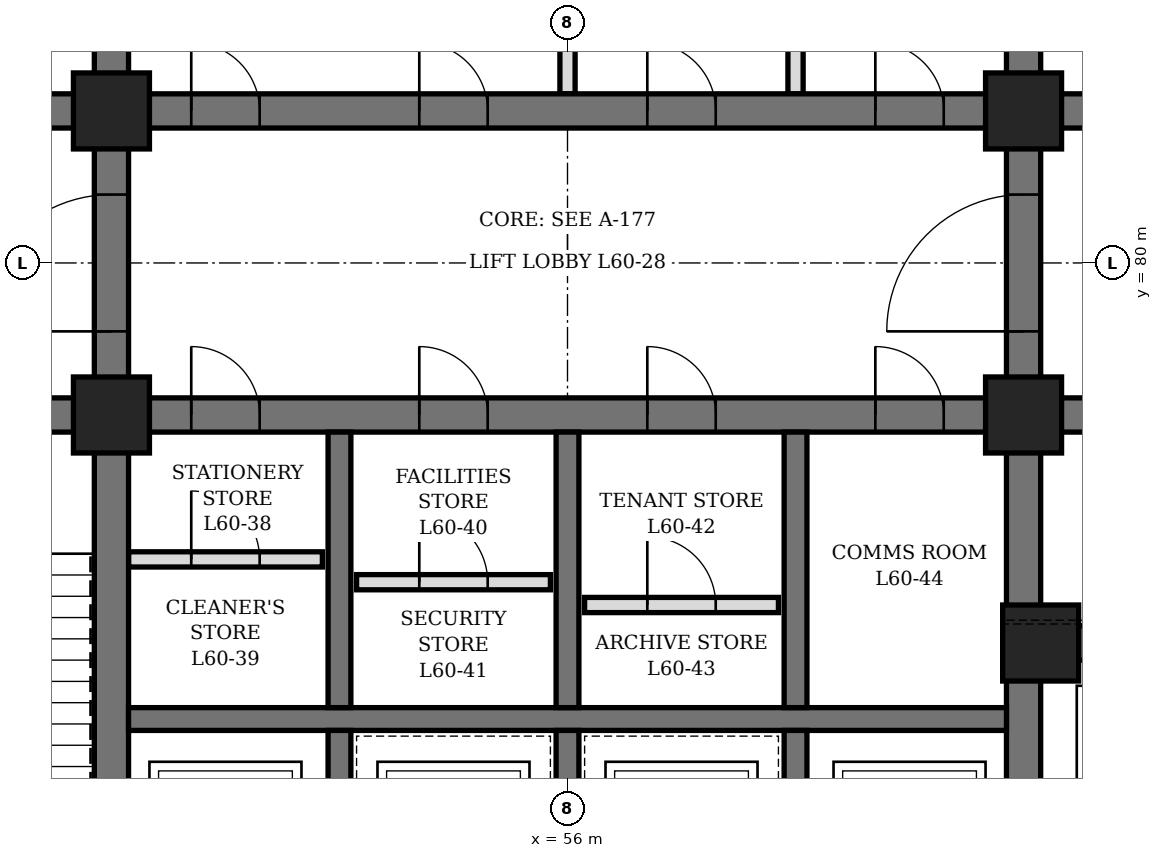
"""IFC4 building model, lengths in metres.
Left out: names, types, materials, properties, quantities, classifications, styles, units other than length and angle.
Written with IfcOpenShell. Run it as: python <this file> out.ifc"""

import sys

from ifc_helpers import new_model, si_unit, direction, frame, frame_2d, origin, origin_2d, place, context, subcontext, project, spatial, rectangle, hollow_rectangle, extrude, element, fill, save


model = new_model("IFC4")
c1 = context("Model", 3, precision=1e-05, world=origin(), true_north=direction((0.0, 1.0)))
c2 = subcontext(c1, "Body", "Model", "MODEL_VIEW")
j1 = project(units=[si_unit("LENGTHUNIT", "METRE"), si_unit("PLANEANGLEUNIT", "RADIAN")], contexts=[c1])
p1 = place(None, origin())
s1 = spatial("IfcSite", under=j1, at=p1, CompositionType="ELEMENT")
p2 = place(p1, origin())
s2 = spatial("IfcBuilding", under=s1, at=p2, CompositionType="ELEMENT")
p3 = place(p2, frame((0.0, 0.0, 267.1)))
s3 = spatial("IfcBuildingStorey", under=s2, at=p3, CompositionType="ELEMENT", Elevation=267.1)
p4 = place(p3, frame((50.0, 71.6, 0.0), z_axis=(0.0, 0.0, 1.0), x_axis=(0.0, 1.0, 0.0)))
e1 = element("IfcWall", 1, at=p4, inside=s3, PredefinedType="SHEAR", context=c2, shape_type="SweptSolid", body=[
    extrude(rectangle(XDim=16.8, YDim=0.45, at=frame_2d((8.4, 0.0))), origin(), (0.0, 0.0, 1.0), 4.2),
])
p5 = place(p4, frame((7.5, 0.0, 0.0)))
e2 = element("IfcOpeningElement", 2, at=p5, cuts=e1, PredefinedType="OPENING", context=c2, shape_type="SweptSolid", body=[
    extrude(rectangle(XDim=1.8, YDim=2.4, at=frame_2d((0.9, 1.2))), frame((0.0, 0.235, 0.0), z_axis=(0.0, -1.0, 0.0), x_axis=(1.0, 0.0, 0.0)), (0.0, 0.0, 1.0), 0.47),
])
p6 = place(p3, frame((62.0, 71.6, 0.0), z_axis=(0.0, 0.0, 1.0), x_axis=(0.0, 1.0, 0.0)))
e3 = element("IfcWall", 3, at=p6, inside=s3, PredefinedType="SHEAR", context=c2, shape_type="SweptSolid", body=[
    extrude(rectangle(XDim=16.8, YDim=0.45, at=frame_2d((8.4, 0.0))), origin(), (0.0, 0.0, 1.0), 4.2),
])
p7 = place(p6, frame((7.5, 0.0, 0.0)))
e4 = element("IfcOpeningElement", 4, at=p7, cuts=e3, PredefinedType="OPENING", context=c2, shape_type="SweptSolid", body=[
    extrude(rectangle(XDim=1.8, YDim=2.4, at=frame_2d((0.9, 1.2))), frame((0.0, 0.235, 0.0), z_axis=(0.0, -1.0, 0.0), x_axis=(1.0, 0.0, 0.0)), (0.0, 0.0, 1.0), 0.47),
])
p8 = place(p3, frame((44.6, 78.0, 0.0), z_axis=(0.0, 0.0, 1.0), x_axis=(1.0, 0.0, 0.0)))
e5 = element("IfcWall", 5, at=p8, inside=s3, PredefinedType="SHEAR", context=c2, shape_type="SweptSolid", body=[
    extrude(rectangle(XDim=5.175, YDim=0.45, at=frame_2d((2.587, 0.0))), origin(), (0.0, 0.0, 1.0), 4.2),
])
p9 = place(p8, frame((1.8, 0.0, 0.0)))
e6 = element("IfcOpeningElement", 6, at=p9, cuts=e5, PredefinedType="OPENING", context=c2, shape_type="SweptSolid", body=[
    extrude(rectangle(XDim=1.2, YDim=2.1, at=frame_2d((0.6, 1.05))), frame((0.0, 0.235, 0.0), z_axis=(0.0, -1.0, 0.0), x_axis=(1.0, 0.0, 0.0)), (0.0, 0.0, 1.0), 0.47),
])
p10 = place(p3, frame((44.6, 82.0, 0.0), z_axis=(0.0, 0.0, 1.0), x_axis=(1.0, 0.0, 0.0)))
e7 = element("IfcWall", 7, at=p10, inside=s3, PredefinedType="SHEAR", context=c2, shape_type="SweptSolid", body=[
    extrude(rectangle(XDim=5.175, YDim=0.45, at=frame_2d((2.587, 0.0))), origin(), (0.0, 0.0, 1.0), 4.2),
])
p11 = place(p10, frame((0.7, 0.0, 0.0)))
e8 = element("IfcOpeningElement", 8, at=p11, cuts=e7, PredefinedType="OPENING", context=c2, shape_type="SweptSolid", body=[
    extrude(rectangle(XDim=0.9, YDim=2.1, at=frame_2d((0.45, 1.05))), frame((0.0, 0.235, 0.0), z_axis=(0.0, -1.0, 0.0), x_axis=(1.0, 0.0, 0.0)), (0.0, 0.0, 1.0), 0.47),
])
p12 = place(p3, frame((62.225, 75.0, 0.0), z_axis=(0.0, 0.0, 1.0), x_axis=(1.0, 0.0, 0.0)))
e9 = element("IfcWall", 9, at=p12, inside=s3, PredefinedType="SHEAR", context=c2, shape_type="SweptSolid", body=[
    extrude(rectangle(XDim=5.175, YDim=0.45, at=frame_2d((2.587, 0.0))), origin(), (0.0, 0.0, 1.0), 4.2),
])
p13 = place(p12, frame((0.675, 0.0, 0.0)))
e10 = element("IfcOpeningElement", 10, at=p13, cuts=e9, PredefinedType="OPENING", context=c2, shape_type="SweptSolid", body=[
    extrude(rectangle(XDim=1.2, YDim=2.2, at=frame_2d((0.6, 1.1))), frame((0.0, 0.235, 0.0), z_axis=(0.0, -1.0, 0.0), x_axis=(1.0, 0.0, 0.0)), (0.0, 0.0, 1.0), 0.47),
])
p14 = place(p12, frame((3.425, 0.0, 0.0)))
e11 = element("IfcOpeningElement", 11, at=p14, cuts=e9, PredefinedType="OPENING", context=c2, shape_type="SweptSolid", body=[
    extrude(rectangle(XDim=1.2, YDim=2.2, at=frame_2d((0.6, 1.1))), frame((0.0, 0.235, 0.0), z_axis=(0.0, -1.0, 0.0), x_axis=(1.0, 0.0, 0.0)), (0.0, 0.0, 1.0), 0.47),
])
p15 = place(p3, frame((62.225, 78.0, 0.0), z_axis=(0.0, 0.0, 1.0), x_axis=(1.0, 0.0, 0.0)))
e12 = element("IfcWall", 12, at=p15, inside=s3, PredefinedType="SHEAR", context=c2, shape_type="SweptSolid", body=[
    extrude(rectangle(XDim=5.175, YDim=0.45, at=frame_2d((2.587, 0.0))), origin(), (0.0, 0.0, 1.0), 4.2),
])
p16 = place(p15, frame((2.175, 0.0, 0.0)))
e13 = element("IfcOpeningElement", 13, at=p16, cuts=e12, PredefinedType="OPENING", context=c2, shape_type="SweptSolid", body=[
    extrude(rectangle(XDim=1.2, YDim=2.1, at=frame_2d((0.6, 1.05))), frame((0.0, 0.235, 0.0), z_axis=(0.0, -1.0, 0.0), x_axis=(1.0, 0.0, 0.0)), (0.0, 0.0, 1.0), 0.47),
])
p17 = place(p3, frame((62.225, 82.0, 0.0), z_axis=(0.0, 0.0, 1.0), x_axis=(1.0, 0.0, 0.0)))
e14 = element("IfcWall", 14, at=p17, inside=s3, PredefinedType="SHEAR", context=c2, shape_type="SweptSolid", body=[
    extrude(rectangle(XDim=5.175, YDim=0.45, at=frame_2d((2.587, 0.0))), origin(), (0.0, 0.0, 1.0), 4.2),
])
p18 = place(p17, frame((2.175, 0.0, 0.0)))
e15 = element("IfcOpeningElement", 15, at=p18, cuts=e14, PredefinedType="OPENING", context=c2, shape_type="SweptSolid", body=[
    extrude(rectangle(XDim=1.2, YDim=2.1, at=frame_2d((0.6, 1.05))), frame((0.0, 0.235, 0.0), z_axis=(0.0, -1.0, 0.0), x_axis=(1.0, 0.0, 0.0)), (0.0, 0.0, 1.0), 0.47),
])
p19 = place(p3, frame((50.225, 78.0, 0.0), z_axis=(0.0, 0.0, 1.0), x_axis=(1.0, 0.0, 0.0)))
e16 = element("IfcWall", 16, at=p19, inside=s3, PredefinedType="SHEAR", context=c2, shape_type="SweptSolid", body=[
    extrude(rectangle(XDim=11.55, YDim=0.45, at=frame_2d((5.775, 0.0))), origin(), (0.0, 0.0, 1.0), 4.2),
])
p20 = place(p19, frame((0.825, 0.0, 0.0)))
e17 = element("IfcOpeningElement", 17, at=p20, cuts=e16, PredefinedType="OPENING", context=c2, shape_type="SweptSolid", body=[
    extrude(rectangle(XDim=0.9, YDim=2.1, at=frame_2d((0.45, 1.05))), frame((0.0, 0.235, 0.0), z_axis=(0.0, -1.0, 0.0), x_axis=(1.0, 0.0, 0.0)), (0.0, 0.0, 1.0), 0.47),
])
p21 = place(p19, frame((3.825, 0.0, 0.0)))
e18 = element("IfcOpeningElement", 18, at=p21, cuts=e16, PredefinedType="OPENING", context=c2, shape_type="SweptSolid", body=[
    extrude(rectangle(XDim=0.9, YDim=2.1, at=frame_2d((0.45, 1.05))), frame((0.0, 0.235, 0.0), z_axis=(0.0, -1.0, 0.0), x_axis=(1.0, 0.0, 0.0)), (0.0, 0.0, 1.0), 0.47),
])
p22 = place(p19, frame((6.825, 0.0, 0.0)))
e19 = element("IfcOpeningElement", 19, at=p22, cuts=e16, PredefinedType="OPENING", context=c2, shape_type="SweptSolid", body=[
    extrude(rectangle(XDim=0.9, YDim=2.1, at=frame_2d((0.45, 1.05))), frame((0.0, 0.235, 0.0), z_axis=(0.0, -1.0, 0.0), x_axis=(1.0, 0.0, 0.0)), (0.0, 0.0, 1.0), 0.47),
])
p23 = place(p19, frame((9.825, 0.0, 0.0)))
e20 = element("IfcOpeningElement", 20, at=p23, cuts=e16, PredefinedType="OPENING", context=c2, shape_type="SweptSolid", body=[
    extrude(rectangle(XDim=0.9, YDim=2.1, at=frame_2d((0.45, 1.05))), frame((0.0, 0.235, 0.0), z_axis=(0.0, -1.0, 0.0), x_axis=(1.0, 0.0, 0.0)), (0.0, 0.0, 1.0), 0.47),
])
p24 = place(p3, frame((50.225, 82.0, 0.0), z_axis=(0.0, 0.0, 1.0), x_axis=(1.0, 0.0, 0.0)))
e21 = element("IfcWall", 21, at=p24, inside=s3, PredefinedType="SHEAR", context=c2, shape_type="SweptSolid", body=[
    extrude(rectangle(XDim=11.55, YDim=0.45, at=frame_2d((5.775, 0.0))), origin(), (0.0, 0.0, 1.0), 4.2),
])
p25 = place(p24, frame((0.825, 0.0, 0.0)))
e22 = element("IfcOpeningElement", 22, at=p25, cuts=e21, PredefinedType="OPENING", context=c2, shape_type="SweptSolid", body=[
    extrude(rectangle(XDim=0.9, YDim=2.1, at=frame_2d((0.45, 1.05))), frame((0.0, 0.235, 0.0), z_axis=(0.0, -1.0, 0.0), x_axis=(1.0, 0.0, 0.0)), (0.0, 0.0, 1.0), 0.47),
])
p26 = place(p24, frame((3.825, 0.0, 0.0)))
e23 = element("IfcOpeningElement", 23, at=p26, cuts=e21, PredefinedType="OPENING", context=c2, shape_type="SweptSolid", body=[
    extrude(rectangle(XDim=0.9, YDim=2.1, at=frame_2d((0.45, 1.05))), frame((0.0, 0.235, 0.0), z_axis=(0.0, -1.0, 0.0), x_axis=(1.0, 0.0, 0.0)), (0.0, 0.0, 1.0), 0.47),
])
p27 = place(p24, frame((6.825, 0.0, 0.0)))
e24 = element("IfcOpeningElement", 24, at=p27, cuts=e21, PredefinedType="OPENING", context=c2, shape_type="SweptSolid", body=[
    extrude(rectangle(XDim=0.9, YDim=2.1, at=frame_2d((0.45, 1.05))), frame((0.0, 0.235, 0.0), z_axis=(0.0, -1.0, 0.0), x_axis=(1.0, 0.0, 0.0)), (0.0, 0.0, 1.0), 0.47),
])
p28 = place(p24, frame((9.825, 0.0, 0.0)))
e25 = element("IfcOpeningElement", 25, at=p28, cuts=e21, PredefinedType="OPENING", context=c2, shape_type="SweptSolid", body=[
    extrude(rectangle(XDim=0.9, YDim=2.1, at=frame_2d((0.45, 1.05))), frame((0.0, 0.235, 0.0), z_axis=(0.0, -1.0, 0.0), x_axis=(1.0, 0.0, 0.0)), (0.0, 0.0, 1.0), 0.47),
])
p29 = place(p3, frame((50.225, 74.0, 0.0), z_axis=(0.0, 0.0, 1.0), x_axis=(1.0, 0.0, 0.0)))
e26 = element("IfcWall", 26, at=p29, inside=s3, PredefinedType="SHEAR", context=c2, shape_type="SweptSolid", body=[
    extrude(rectangle(XDim=11.55, YDim=0.3, at=frame_2d((5.775, 0.0))), origin(), (0.0, 0.0, 1.0), 4.2),
])
p30 = place(p3, frame((53.0, 71.6, 0.0), z_axis=(0.0, 0.0, 1.0), x_axis=(0.0, 1.0, 0.0)))
e27 = element("IfcWall", 27, at=p30, inside=s3, PredefinedType="SHEAR", context=c2, shape_type="SweptSolid", body=[
    extrude(rectangle(XDim=2.25, YDim=0.3, at=frame_2d((1.125, 0.0))), origin(), (0.0, 0.0, 1.0), 4.2),
])
p31 = place(p3, frame((53.0, 74.15, 0.0), z_axis=(0.0, 0.0, 1.0), x_axis=(0.0, 1.0, 0.0)))
e28 = element("IfcWall", 28, at=p31, inside=s3, PredefinedType="SHEAR", context=c2, shape_type="SweptSolid", body=[
    extrude(rectangle(XDim=3.625, YDim=0.3, at=frame_2d((1.812, 0.0))), origin(), (0.0, 0.0, 1.0), 4.2),
])
p32 = place(p3, frame((56.0, 71.6, 0.0), z_axis=(0.0, 0.0, 1.0), x_axis=(0.0, 1.0, 0.0)))
e29 = element("IfcWall", 29, at=p32, inside=s3, PredefinedType="SHEAR", context=c2, shape_type="SweptSolid", body=[
    extrude(rectangle(XDim=2.25, YDim=0.3, at=frame_2d((1.125, 0.0))), origin(), (0.0, 0.0, 1.0), 4.2),
])
p33 = place(p3, frame((56.0, 74.15, 0.0), z_axis=(0.0, 0.0, 1.0), x_axis=(0.0, 1.0, 0.0)))
e30 = element("IfcWall", 30, at=p33, inside=s3, PredefinedType="SHEAR", context=c2, shape_type="SweptSolid", body=[
    extrude(rectangle(XDim=3.625, YDim=0.3, at=frame_2d((1.812, 0.0))), origin(), (0.0, 0.0, 1.0), 4.2),
])
p34 = place(p3, frame((59.0, 71.6, 0.0), z_axis=(0.0, 0.0, 1.0), x_axis=(0.0, 1.0, 0.0)))
e31 = element("IfcWall", 31, at=p34, inside=s3, PredefinedType="SHEAR", context=c2, shape_type="SweptSolid", body=[
    extrude(rectangle(XDim=2.25, YDim=0.3, at=frame_2d((1.125, 0.0))), origin(), (0.0, 0.0, 1.0), 4.2),
])
p35 = place(p3, frame((59.0, 74.15, 0.0), z_axis=(0.0, 0.0, 1.0), x_axis=(0.0, 1.0, 0.0)))
e32 = element("IfcWall", 32, at=p35, inside=s3, PredefinedType="SHEAR", context=c2, shape_type="SweptSolid", body=[
    extrude(rectangle(XDim=3.625, YDim=0.3, at=frame_2d((1.812, 0.0))), origin(), (0.0, 0.0, 1.0), 4.2),
])
for number, where, z_axis, x_axis in (
    (33, (50.0, 78.0, 0.0), (0.0, 0.0, 1.0), (1.0, 0.0, 0.0)),
    (34, (50.0, 82.0, 0.0), (0.0, 0.0, 1.0), (1.0, 0.0, 0.0)),
    (35, (62.0, 78.0, 0.0), (0.0, 0.0, 1.0), (1.0, 0.0, 0.0)),
    (36, (62.0, 82.0, 0.0), (0.0, 0.0, 1.0), (1.0, 0.0, 0.0)),
    (37, (62.225, 75.0, 0.0), (0.0, 0.0, 1.0), (1.0, 0.0, 0.0)),
):
    element("IfcColumn", number, at=place(p3, frame(where, z_axis=z_axis, x_axis=x_axis)), inside=s3, PredefinedType="COLUMN", context=c2, shape_type="SweptSolid", body=[
        extrude(hollow_rectangle(XDim=1.0, YDim=1.0, WallThickness=0.15, at=origin_2d()), origin(), (0.0, 0.0, 1.0), 4.2),
    ])
p36 = place(p3, frame((50.225, 76.1, 0.0), z_axis=(0.0, 0.0, 1.0), x_axis=(1.0, 0.0, 0.0)))
e38 = element("IfcWall", 38, at=p36, inside=s3, PredefinedType="PARTITIONING", context=c2, shape_type="SweptSolid", body=[
    extrude(rectangle(XDim=2.55, YDim=0.2, at=frame_2d((1.275, 0.0))), origin(), (0.0, 0.0, 1.0), 4.04),
])
p37 = place(p36, frame((0.825, 0.0, 0.0)))
e39 = element("IfcOpeningElement", 39, at=p37, cuts=e38, PredefinedType="OPENING", context=c2, shape_type="SweptSolid", body=[
    extrude(rectangle(XDim=0.9, YDim=2.1, at=frame_2d((0.45, 1.05))), frame((0.0, 0.11, 0.0), z_axis=(0.0, -1.0, 0.0), x_axis=(1.0, 0.0, 0.0)), (0.0, 0.0, 1.0), 0.22),
])
p38 = place(p3, frame((53.225, 75.8, 0.0), z_axis=(0.0, 0.0, 1.0), x_axis=(1.0, 0.0, 0.0)))
e40 = element("IfcWall", 40, at=p38, inside=s3, PredefinedType="PARTITIONING", context=c2, shape_type="SweptSolid", body=[
    extrude(rectangle(XDim=2.55, YDim=0.2, at=frame_2d((1.275, 0.0))), origin(), (0.0, 0.0, 1.0), 4.04),
])
p39 = place(p38, frame((0.825, 0.0, 0.0)))
e41 = element("IfcOpeningElement", 41, at=p39, cuts=e40, PredefinedType="OPENING", context=c2, shape_type="SweptSolid", body=[
    extrude(rectangle(XDim=0.9, YDim=2.1, at=frame_2d((0.45, 1.05))), frame((0.0, 0.11, 0.0), z_axis=(0.0, -1.0, 0.0), x_axis=(1.0, 0.0, 0.0)), (0.0, 0.0, 1.0), 0.22),
])
p40 = place(p3, frame((56.225, 75.5, 0.0), z_axis=(0.0, 0.0, 1.0), x_axis=(1.0, 0.0, 0.0)))
e42 = element("IfcWall", 42, at=p40, inside=s3, PredefinedType="PARTITIONING", context=c2, shape_type="SweptSolid", body=[
    extrude(rectangle(XDim=2.55, YDim=0.2, at=frame_2d((1.275, 0.0))), origin(), (0.0, 0.0, 1.0), 4.04),
])
p41 = place(p40, frame((0.825, 0.0, 0.0)))
e43 = element("IfcOpeningElement", 43, at=p41, cuts=e42, PredefinedType="OPENING", context=c2, shape_type="SweptSolid", body=[
    extrude(rectangle(XDim=0.9, YDim=2.1, at=frame_2d((0.45, 1.05))), frame((0.0, 0.11, 0.0), z_axis=(0.0, -1.0, 0.0), x_axis=(1.0, 0.0, 0.0)), (0.0, 0.0, 1.0), 0.22),
])
p42 = place(p3, frame((56.0, 82.225, 0.0), z_axis=(0.0, 0.0, 1.0), x_axis=(0.0, 1.0, 0.0)))
e44 = element("IfcWall", 44, at=p42, inside=s3, PredefinedType="PARTITIONING", context=c2, shape_type="SweptSolid", body=[
    extrude(rectangle(XDim=3.55, YDim=0.2, at=frame_2d((1.775, 0.0))), origin(), (0.0, 0.0, 1.0), 3.14),
])
p43 = place(p3, frame((59.0, 82.225, 0.0), z_axis=(0.0, 0.0, 1.0), x_axis=(0.0, 1.0, 0.0)))
e45 = element("IfcWall", 45, at=p43, inside=s3, PredefinedType="PARTITIONING", context=c2, shape_type="SweptSolid", body=[
    extrude(rectangle(XDim=3.55, YDim=0.2, at=frame_2d((1.775, 0.0))), origin(), (0.0, 0.0, 1.0), 4.04),
])
p44 = place(p20, origin())
e46 = element("IfcDoor", 46, at=p44, inside=s3, OperationType="SINGLE_SWING_LEFT", PredefinedType="DOOR", context=c2, shape_type="SweptSolid", body=[
    extrude(rectangle(XDim=0.9, YDim=2.1, at=frame_2d((0.45, 1.05))), frame((0.0, 0.225, 0.0), z_axis=(0.0, -1.0, 0.0), x_axis=(1.0, 0.0, 0.0)), (0.0, 0.0, 1.0), 0.449),
])
fill(e17, e46)
p45 = place(p37, origin())
e47 = element("IfcDoor", 47, at=p45, inside=s3, OperationType="SINGLE_SWING_LEFT", PredefinedType="DOOR", context=c2, shape_type="SweptSolid", body=[
    extrude(rectangle(XDim=0.9, YDim=2.1, at=frame_2d((0.45, 1.05))), frame((0.0, 0.1, 0.0), z_axis=(0.0, -1.0, 0.0), x_axis=(1.0, 0.0, 0.0)), (0.0, 0.0, 1.0), 0.199),
])
fill(e39, e47)
p46 = place(p21, origin())
e48 = element("IfcDoor", 48, at=p46, inside=s3, OperationType="SINGLE_SWING_LEFT", PredefinedType="DOOR", context=c2, shape_type="SweptSolid", body=[
    extrude(rectangle(XDim=0.9, YDim=2.1, at=frame_2d((0.45, 1.05))), frame((0.0, 0.225, 0.0), z_axis=(0.0, -1.0, 0.0), x_axis=(1.0, 0.0, 0.0)), (0.0, 0.0, 1.0), 0.449),
])
fill(e18, e48)
p47 = place(p39, origin())
e49 = element("IfcDoor", 49, at=p47, inside=s3, OperationType="SINGLE_SWING_LEFT", PredefinedType="DOOR", context=c2, shape_type="SweptSolid", body=[
    extrude(rectangle(XDim=0.9, YDim=2.1, at=frame_2d((0.45, 1.05))), frame((0.0, 0.1, 0.0), z_axis=(0.0, -1.0, 0.0), x_axis=(1.0, 0.0, 0.0)), (0.0, 0.0, 1.0), 0.199),
])
fill(e41, e49)
p48 = place(p22, origin())
e50 = element("IfcDoor", 50, at=p48, inside=s3, OperationType="SINGLE_SWING_LEFT", PredefinedType="DOOR", context=c2, shape_type="SweptSolid", body=[
    extrude(rectangle(XDim=0.9, YDim=2.1, at=frame_2d((0.45, 1.05))), frame((0.0, 0.225, 0.0), z_axis=(0.0, -1.0, 0.0), x_axis=(1.0, 0.0, 0.0)), (0.0, 0.0, 1.0), 0.449),
])
fill(e19, e50)
p49 = place(p41, origin())
e51 = element("IfcDoor", 51, at=p49, inside=s3, OperationType="SINGLE_SWING_LEFT", PredefinedType="DOOR", context=c2, shape_type="SweptSolid", body=[
    extrude(rectangle(XDim=0.9, YDim=2.1, at=frame_2d((0.45, 1.05))), frame((0.0, 0.1, 0.0), z_axis=(0.0, -1.0, 0.0), x_axis=(1.0, 0.0, 0.0)), (0.0, 0.0, 1.0), 0.199),
])
fill(e43, e51)
p50 = place(p23, origin())
e52 = element("IfcDoor", 52, at=p50, inside=s3, OperationType="SINGLE_SWING_LEFT", PredefinedType="DOOR", context=c2, shape_type="SweptSolid", body=[
    extrude(rectangle(XDim=0.9, YDim=2.1, at=frame_2d((0.45, 1.05))), frame((0.0, 0.225, 0.0), z_axis=(0.0, -1.0, 0.0), x_axis=(1.0, 0.0, 0.0)), (0.0, 0.0, 1.0), 0.449),
])
fill(e20, e52)
p51 = place(p25, origin())
e53 = element("IfcDoor", 53, at=p51, inside=s3, OperationType="SINGLE_SWING_LEFT", PredefinedType="DOOR", context=c2, shape_type="SweptSolid", body=[
    extrude(rectangle(XDim=0.9, YDim=2.1, at=frame_2d((0.45, 1.05))), frame((0.0, 0.225, 0.0), z_axis=(0.0, -1.0, 0.0), x_axis=(1.0, 0.0, 0.0)), (0.0, 0.0, 1.0), 0.449),
])
fill(e22, e53)
p52 = place(p26, origin())
e54 = element("IfcDoor", 54, at=p52, inside=s3, OperationType="SINGLE_SWING_LEFT", PredefinedType="DOOR", context=c2, shape_type="SweptSolid", body=[
    extrude(rectangle(XDim=0.9, YDim=2.1, at=frame_2d((0.45, 1.05))), frame((0.0, 0.225, 0.0), z_axis=(0.0, -1.0, 0.0), x_axis=(1.0, 0.0, 0.0)), (0.0, 0.0, 1.0), 0.449),
])
fill(e23, e54)
p53 = place(p27, origin())
e55 = element("IfcDoor", 55, at=p53, inside=s3, OperationType="SINGLE_SWING_LEFT", PredefinedType="DOOR", context=c2, shape_type="SweptSolid", body=[
    extrude(rectangle(XDim=0.9, YDim=2.1, at=frame_2d((0.45, 1.05))), frame((0.0, 0.225, 0.0), z_axis=(0.0, -1.0, 0.0), x_axis=(1.0, 0.0, 0.0)), (0.0, 0.0, 1.0), 0.449),
])
fill(e24, e55)
p54 = place(p28, origin())
e56 = element("IfcDoor", 56, at=p54, inside=s3, OperationType="SINGLE_SWING_LEFT", PredefinedType="DOOR", context=c2, shape_type="SweptSolid", body=[
    extrude(rectangle(XDim=0.9, YDim=2.1, at=frame_2d((0.45, 1.05))), frame((0.0, 0.225, 0.0), z_axis=(0.0, -1.0, 0.0), x_axis=(1.0, 0.0, 0.0)), (0.0, 0.0, 1.0), 0.449),
])
fill(e25, e56)
p55 = place(p5, origin())
e57 = element("IfcDoor", 57, at=p55, inside=s3, OperationType="DOUBLE_DOOR_SINGLE_SWING", PredefinedType="DOOR", context=c2, shape_type="SweptSolid", body=[
    extrude(rectangle(XDim=1.8, YDim=2.4, at=frame_2d((0.9, 1.2))), frame((0.0, 0.225, 0.0), z_axis=(0.0, -1.0, 0.0), x_axis=(1.0, 0.0, 0.0)), (0.0, 0.0, 1.0), 0.449),
])
fill(e2, e57)
p56 = place(p7, origin())
e58 = element("IfcDoor", 58, at=p56, inside=s3, OperationType="DOUBLE_DOOR_SINGLE_SWING", PredefinedType="DOOR", context=c2, shape_type="SweptSolid", body=[
    extrude(rectangle(XDim=1.8, YDim=2.4, at=frame_2d((0.9, 1.2))), frame((0.0, 0.225, 0.0), z_axis=(0.0, -1.0, 0.0), x_axis=(1.0, 0.0, 0.0)), (0.0, 0.0, 1.0), 0.449),
])
fill(e4, e58)
save(model, sys.argv[1])
